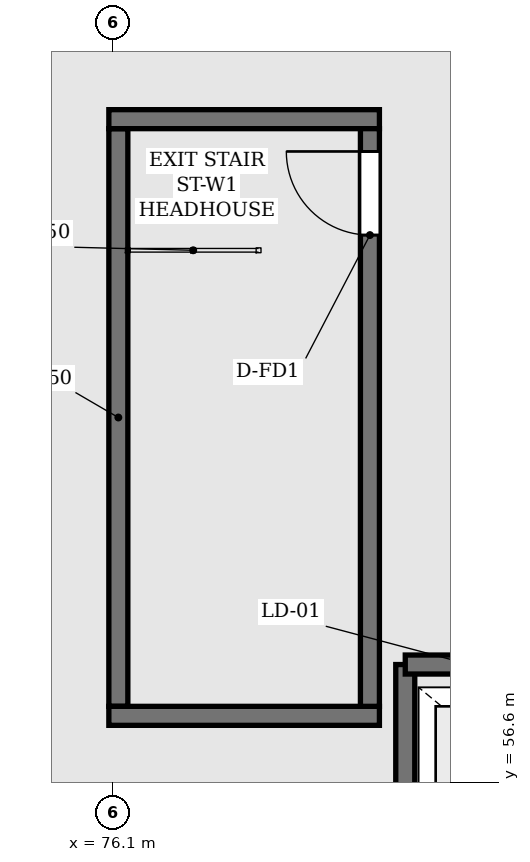
"""IFC4 building model, lengths in metres.
Left out: names, types, materials, properties, quantities, classifications, styles, units other than length and angle.
Written with IfcOpenShell. Run it as: python <this file> out.ifc"""

import sys

from ifc_helpers import new_model, si_unit, direction, frame, frame_2d, origin, place, context, subcontext, project, spatial, rectangle, extrude, element, fill, save


model = new_model("IFC4")
c1 = context("Model", 3, precision=1e-05, world=origin(), true_north=direction((0.0, 1.0)))
c2 = subcontext(c1, "Body", "Model", "MODEL_VIEW")
j1 = project(units=[si_unit("LENGTHUNIT", "METRE"), si_unit("PLANEANGLEUNIT", "RADIAN")], contexts=[c1])
p1 = place(None, origin())
s1 = spatial("IfcSite", under=j1, at=p1, CompositionType="ELEMENT")
p2 = place(p1, origin())
s2 = spatial("IfcBuilding", under=s1, at=p2, CompositionType="ELEMENT")
p3 = place(p2, frame((0.0, 0.0, 264.2)))
s3 = spatial("IfcBuildingStorey", under=s2, at=p3, CompositionType="ELEMENT", Elevation=264.2)
p4 = place(p3, frame((76.175, 57.6, 0.0), z_axis=(0.0, 0.0, 1.0), x_axis=(0.0, 1.0, 0.0)))
e1 = element("IfcWall", 1, at=p4, inside=s3, PredefinedType="SHEAR", context=c2, shape_type="SweptSolid", body=[
    extrude(rectangle(XDim=7.6, YDim=0.25, at=frame_2d((3.8, 0.0))), origin(), (0.0, 0.0, 1.0), 11.95),
])
for number, where, z_axis, x_axis in (
    (2, (76.05, 57.475, 0.0), (0.0, 0.0, 1.0), (1.0, 0.0, 0.0)),
    (3, (76.05, 65.325, 0.0), (0.0, 0.0, 1.0), (1.0, 0.0, 0.0)),
):
    element("IfcWall", number, at=place(p3, frame(where, z_axis=z_axis, x_axis=x_axis)), inside=s3, PredefinedType="SHEAR", context=c2, shape_type="SweptSolid", body=[
        extrude(rectangle(XDim=3.56, YDim=0.25, at=frame_2d((1.78, 0.0))), origin(), (0.0, 0.0, 1.0), 11.95),
    ])
p5 = place(p3, frame((79.485, 57.6, 0.0), z_axis=(0.0, 0.0, 1.0), x_axis=(0.0, 1.0, 0.0)))
e4 = element("IfcWall", 4, at=p5, inside=s3, PredefinedType="SHEAR", context=c2, shape_type="SweptSolid", body=[
    extrude(rectangle(XDim=7.6, YDim=0.25, at=frame_2d((3.8, 0.0))), origin(), (0.0, 0.0, 1.0), 11.95),
])
p6 = place(p5, frame((6.2, 0.0, 0.0)))
e5 = element("IfcOpeningElement", 5, at=p6, cuts=e4, PredefinedType="OPENING", context=c2, shape_type="SweptSolid", body=[
    extrude(rectangle(XDim=1.1, YDim=2.1, at=frame_2d((0.55, 1.05))), frame((0.0, 0.135, 0.0), z_axis=(0.0, -1.0, 0.0), x_axis=(1.0, 0.0, 0.0)), (0.0, 0.0, 1.0), 0.27),
])
p7 = place(p3, frame((79.95, 55.55, 0.0), z_axis=(0.0, 0.0, 1.0), x_axis=(0.0, 1.0, 0.0)))
e6 = element("IfcWall", 6, at=p7, inside=s3, PredefinedType="SHEAR", context=c2, shape_type="SweptSolid", body=[
    extrude(rectangle(XDim=2.6, YDim=0.25, at=frame_2d((1.3, 0.0))), origin(), (0.0, 0.0, 1.0), 11.95),
])
p8 = place(p3, frame((79.95, 58.15, 0.0), z_axis=(0.0, 0.0, 1.0), x_axis=(1.0, 0.0, 0.0)))
e7 = element("IfcWall", 7, at=p8, inside=s3, PredefinedType="SHEAR", context=c2, shape_type="SweptSolid", body=[
    extrude(rectangle(XDim=2.9, YDim=0.25, at=frame_2d((1.45, 0.0))), origin(), (0.0, 0.0, 1.0), 11.95),
])
p9 = place(p8, frame((0.85, 0.0, 0.0)))
e8 = element("IfcOpeningElement", 8, at=p9, cuts=e7, PredefinedType="OPENING", context=c2, shape_type="SweptSolid", body=[
    extrude(rectangle(XDim=1.12, YDim=2.12, at=frame_2d((0.56, 1.06))), frame((0.0, 0.135, 0.0), z_axis=(0.0, -1.0, 0.0), x_axis=(1.0, 0.0, 0.0)), (0.0, 0.0, 1.0), 0.27),
])
p10 = place(p6, origin())
e9 = element("IfcDoor", 9, at=p10, inside=s3, OperationType="SINGLE_SWING_RIGHT", PredefinedType="DOOR", context=c2, shape_type="SweptSolid", body=[
    extrude(rectangle(XDim=1.1, YDim=2.1, at=frame_2d((0.55, 1.05))), frame((0.0, 0.025, 0.0), z_axis=(0.0, -1.0, 0.0), x_axis=(1.0, 0.0, 0.0)), (0.0, 0.0, 1.0), 0.05),
])
fill(e5, e9)
save(model, sys.argv[1])
